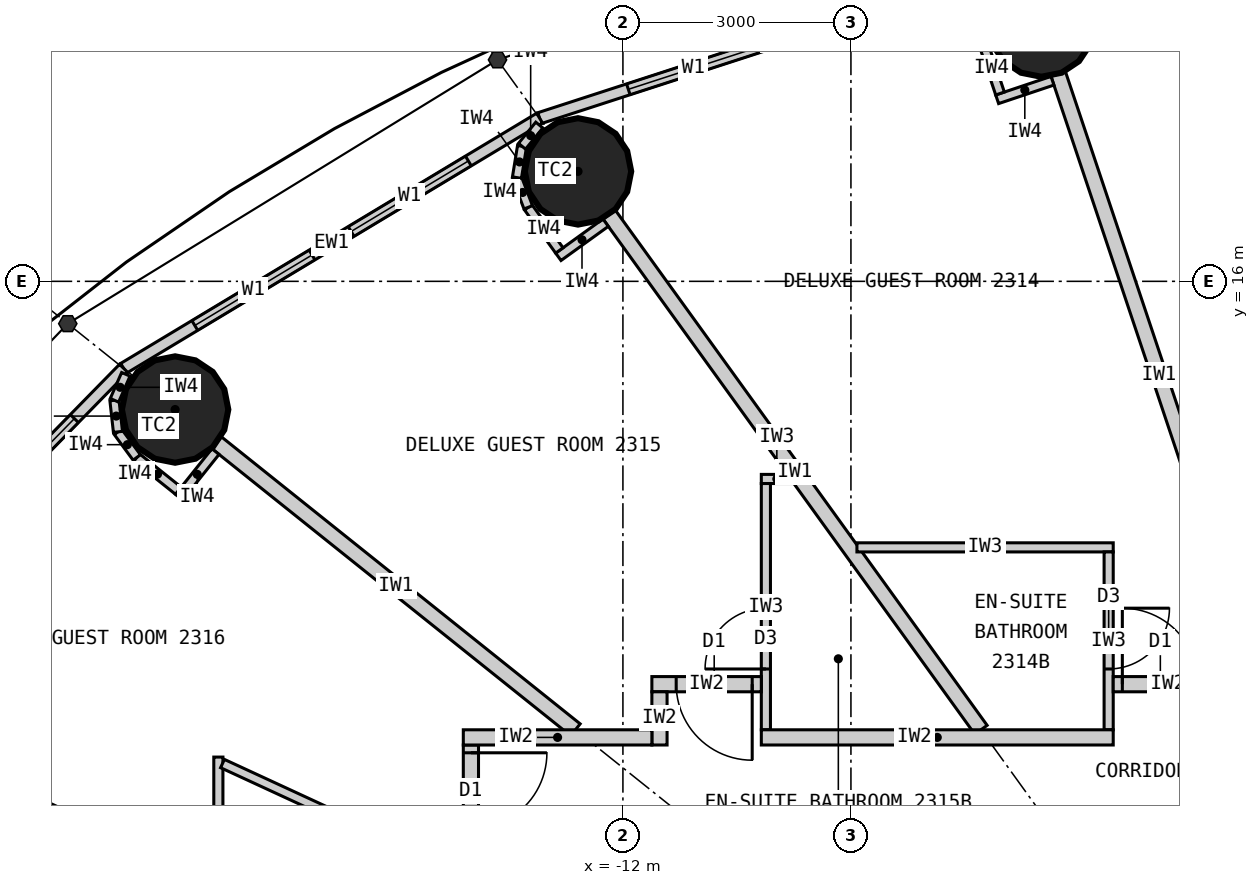
"""IFC4 building model, lengths in metres.
Left out: names, types, materials, properties, quantities, classifications, styles, units other than length and angle.
Written with IfcOpenShell. Run it as: python <this file> out.ifc"""

import sys

from ifc_helpers import new_model, si_unit, direction, frame, frame_2d, origin, origin_2d, place, context, subcontext, project, spatial, rectangle, circle, extrude, clip, halfspace, element, fill, save


model = new_model("IFC4")
c1 = context("Model", 3, precision=1e-05, world=origin(), true_north=direction((0.0, 1.0)))
c2 = subcontext(c1, "Body", "Model", "MODEL_VIEW")
j1 = project(units=[si_unit("LENGTHUNIT", "METRE"), si_unit("PLANEANGLEUNIT", "RADIAN")], contexts=[c1])
p1 = place(None, origin())
s1 = spatial("IfcSite", under=j1, at=p1, CompositionType="ELEMENT")
p2 = place(p1, origin())
s2 = spatial("IfcBuilding", under=s1, at=p2, CompositionType="ELEMENT")
p3 = place(p2, frame((0.0, 0.0, 90.3)))
s3 = spatial("IfcBuildingStorey", under=s2, at=p3, CompositionType="ELEMENT", Elevation=90.3)
for number, where, z_axis, x_axis in (
    (1, (-6.495, 19.391, 0.0), (0.0, 0.0, 1.0), (1.0, 0.0, 0.0)),
    (2, (-12.591, 17.447, 0.0), (0.0, 0.0, 1.0), (1.0, 0.0, 0.0)),
    (3, (-17.892, 14.313, 0.0), (0.0, 0.0, 1.0), (1.0, 0.0, 0.0)),
):
    element("IfcColumn", number, at=place(p3, frame(where, z_axis=z_axis, x_axis=x_axis)), inside=s3, PredefinedType="COLUMN", context=c2, shape_type="Clipping", body=[
        clip(extrude(circle(Radius=0.7, at=origin_2d()), origin(), (0.0, 0.0, 1.0), 3.3), halfspace(frame((0.0, 0.0, 2.25), z_axis=(0.0, 0.0, 1.0), x_axis=(1.0, 0.0, 0.0)), False)),
    ])
p4 = place(p3, frame((-6.766, 20.202, 0.0), z_axis=(0.0, 0.0, 1.0), x_axis=(-0.951137534625, -0.308767534285, 0.0)))
e4 = element("IfcWall", 4, at=p4, inside=s3, PredefinedType="ELEMENTEDWALL", context=c2, shape_type="SweptSolid", body=[
    extrude(rectangle(XDim=6.655, YDim=0.15, at=frame_2d((3.328, 0.0))), origin(), (0.0, 0.0, 1.0), 3.05),
])
p5 = place(p4, frame((1.228, 0.0, 0.9)))
e5 = element("IfcOpeningElement", 5, at=p5, cuts=e4, PredefinedType="OPENING", context=c2, shape_type="SweptSolid", body=[
    extrude(rectangle(XDim=1.8, YDim=1.9, at=frame_2d((0.9, 0.95))), frame((0.0, 0.085, 0.0), z_axis=(0.0, -1.0, 0.0), x_axis=(1.0, 0.0, 0.0)), (0.0, 0.0, 1.0), 0.17),
])
p6 = place(p4, frame((3.628, 0.0, 0.9)))
e6 = element("IfcOpeningElement", 6, at=p6, cuts=e4, PredefinedType="OPENING", context=c2, shape_type="SweptSolid", body=[
    extrude(rectangle(XDim=1.8, YDim=1.9, at=frame_2d((0.9, 0.95))), frame((0.0, 0.085, 0.0), z_axis=(0.0, -1.0, 0.0), x_axis=(1.0, 0.0, 0.0)), (0.0, 0.0, 1.0), 0.17),
])
p7 = place(p3, frame((-13.096, 18.147, 0.0), z_axis=(0.0, 0.0, 1.0), x_axis=(-0.856983180864, -0.515344377787, 0.0)))
e7 = element("IfcWall", 7, at=p7, inside=s3, PredefinedType="ELEMENTEDWALL", context=c2, shape_type="SweptSolid", body=[
    extrude(rectangle(XDim=6.386, YDim=0.15, at=frame_2d((3.193, 0.0))), origin(), (0.0, 0.0, 1.0), 3.05),
])
p8 = place(p7, frame((1.093, 0.0, 0.9)))
e8 = element("IfcOpeningElement", 8, at=p8, cuts=e7, PredefinedType="OPENING", context=c2, shape_type="SweptSolid", body=[
    extrude(rectangle(XDim=1.8, YDim=1.9, at=frame_2d((0.9, 0.95))), frame((0.0, 0.085, 0.0), z_axis=(0.0, -1.0, 0.0), x_axis=(1.0, 0.0, 0.0)), (0.0, 0.0, 1.0), 0.17),
])
p9 = place(p7, frame((3.493, 0.0, 0.9)))
e9 = element("IfcOpeningElement", 9, at=p9, cuts=e7, PredefinedType="OPENING", context=c2, shape_type="SweptSolid", body=[
    extrude(rectangle(XDim=1.8, YDim=1.9, at=frame_2d((0.9, 0.95))), frame((0.0, 0.085, 0.0), z_axis=(0.0, -1.0, 0.0), x_axis=(1.0, 0.0, 0.0)), (0.0, 0.0, 1.0), 0.17),
])
p10 = place(p3, frame((-18.57, 14.856, 0.0), z_axis=(0.0, 0.0, 1.0), x_axis=(-0.699602905915, -0.714531856557, 0.0)))
e10 = element("IfcWall", 10, at=p10, inside=s3, PredefinedType="ELEMENTEDWALL", context=c2, shape_type="SweptSolid", body=[
    extrude(rectangle(XDim=6.051, YDim=0.15, at=frame_2d((3.025, 0.0))), origin(), (0.0, 0.0, 1.0), 3.05),
])
p11 = place(p10, frame((0.926, 0.0, 0.9)))
e11 = element("IfcOpeningElement", 11, at=p11, cuts=e10, PredefinedType="OPENING", context=c2, shape_type="SweptSolid", body=[
    extrude(rectangle(XDim=1.8, YDim=1.9, at=frame_2d((0.9, 0.95))), frame((0.0, 0.085, 0.0), z_axis=(0.0, -1.0, 0.0), x_axis=(1.0, 0.0, 0.0)), (0.0, 0.0, 1.0), 0.17),
])
p12 = place(p10, frame((3.325, 0.0, 0.9)))
e12 = element("IfcOpeningElement", 12, at=p12, cuts=e10, PredefinedType="OPENING", context=c2, shape_type="SweptSolid", body=[
    extrude(rectangle(XDim=1.8, YDim=1.9, at=frame_2d((0.9, 0.95))), frame((0.0, 0.085, 0.0), z_axis=(0.0, -1.0, 0.0), x_axis=(1.0, 0.0, 0.0)), (0.0, 0.0, 1.0), 0.17),
])
p13 = place(p3, frame((-3.617, 10.8, 0.0), z_axis=(0.0, 0.0, 1.0), x_axis=(-0.317576599239, 0.948232621046, 0.0)))
e13 = element("IfcWall", 13, at=p13, inside=s3, PredefinedType="PARTITIONING", context=c2, shape_type="SweptSolid", body=[
    extrude(rectangle(XDim=8.36, YDim=0.2, at=frame_2d((4.18, 0.0))), origin(), (0.0, 0.0, 1.0), 2.15),
])
p14 = place(p3, frame((-7.289, 10.1, 0.0), z_axis=(0.0, 0.0, 1.0), x_axis=(-0.585198353053, 0.810890182197, 0.0)))
e14 = element("IfcWall", 14, at=p14, inside=s3, PredefinedType="PARTITIONING", context=c2, shape_type="SweptSolid", body=[
    extrude(rectangle(XDim=8.36, YDim=0.2, at=frame_2d((4.18, 0.0))), origin(), (0.0, 0.0, 1.0), 2.15),
])
p15 = place(p3, frame((-12.625, 10.1, 0.0), z_axis=(0.0, 0.0, 1.0), x_axis=(-0.780892451574, 0.624665493744, 0.0)))
e15 = element("IfcWall", 15, at=p15, inside=s3, PredefinedType="PARTITIONING", context=c2, shape_type="SweptSolid", body=[
    extrude(rectangle(XDim=6.045, YDim=0.2, at=frame_2d((3.022, 0.0))), origin(), (0.0, 0.0, 1.0), 2.25),
])
p16 = place(p3, frame((-14.1, 6.512, 0.0), z_axis=(0.0, 0.0, 1.0), x_axis=(-0.907832871056, 0.419332181247, 0.0)))
e16 = element("IfcWall", 16, at=p16, inside=s3, PredefinedType="PARTITIONING", context=c2, shape_type="SweptSolid", body=[
    extrude(rectangle(XDim=8.023, YDim=0.2, at=frame_2d((4.011, 0.0))), origin(), (0.0, 0.0, 1.0), 2.15),
])
p17 = place(p3, frame((-8.921, 12.5, 0.0), z_axis=(0.0, 0.0, 1.0), x_axis=(1.0, 0.0, 0.0)))
e17 = element("IfcWall", 17, at=p17, inside=s3, PredefinedType="PARTITIONING", context=c2, shape_type="SweptSolid", body=[
    extrude(rectangle(XDim=3.372, YDim=0.12, at=frame_2d((1.686, 0.0))), origin(), (0.0, 0.0, 1.0), 3.05),
])
p18 = place(p3, frame((-5.609, 10.1, 0.0), z_axis=(0.0, 0.0, 1.0), x_axis=(0.0, 1.0, 0.0)))
e18 = element("IfcWall", 18, at=p18, inside=s3, PredefinedType="PARTITIONING", context=c2, shape_type="SweptSolid", body=[
    extrude(rectangle(XDim=2.34, YDim=0.12, at=frame_2d((1.17, 0.0))), origin(), (0.0, 0.0, 1.0), 3.05),
])
p19 = place(p18, frame((0.8, 0.0, 0.0)))
e19 = element("IfcOpeningElement", 19, at=p19, cuts=e18, PredefinedType="OPENING", context=c2, shape_type="SweptSolid", body=[
    extrude(rectangle(XDim=0.8, YDim=2.1, at=frame_2d((0.4, 1.05))), frame((0.0, 0.07, 0.0), z_axis=(0.0, -1.0, 0.0), x_axis=(1.0, 0.0, 0.0)), (0.0, 0.0, 1.0), 0.14),
])
p20 = place(p3, frame((-9.771, 13.4, 0.0), z_axis=(0.0, 0.0, 1.0), x_axis=(-1.0, 0.0, 0.0)))
e20 = element("IfcWall", 20, at=p20, inside=s3, PredefinedType="PARTITIONING", context=c2, shape_type="SweptSolid", body=[
    extrude(rectangle(XDim=0.408, YDim=0.12, at=frame_2d((0.204, 0.0))), origin(), (0.0, 0.0, 1.0), 3.05),
])
p21 = place(p3, frame((-10.119, 10.1, 0.0), z_axis=(0.0, 0.0, 1.0), x_axis=(0.0, 1.0, 0.0)))
e21 = element("IfcWall", 21, at=p21, inside=s3, PredefinedType="PARTITIONING", context=c2, shape_type="SweptSolid", body=[
    extrude(rectangle(XDim=3.24, YDim=0.12, at=frame_2d((1.62, 0.0))), origin(), (0.0, 0.0, 1.0), 3.05),
])
p22 = place(p21, frame((0.8, 0.0, 0.0)))
e22 = element("IfcOpeningElement", 22, at=p22, cuts=e21, PredefinedType="OPENING", context=c2, shape_type="SweptSolid", body=[
    extrude(rectangle(XDim=0.8, YDim=2.1, at=frame_2d((0.4, 1.05))), frame((0.0, 0.07, 0.0), z_axis=(0.0, -1.0, 0.0), x_axis=(1.0, 0.0, 0.0)), (0.0, 0.0, 1.0), 0.14),
])
p23 = place(p3, frame((-17.323, 8.101, 0.0), z_axis=(0.0, 0.0, 1.0), x_axis=(0.0, 1.0, 0.0)))
e23 = element("IfcWall", 23, at=p23, inside=s3, PredefinedType="PARTITIONING", context=c2, shape_type="SweptSolid", body=[
    extrude(rectangle(XDim=1.64, YDim=0.12, at=frame_2d((0.82, 0.0))), origin(), (0.0, 0.0, 1.0), 3.05),
])
p24 = place(p3, frame((-14.1, 8.193, 0.0), z_axis=(0.0, 0.0, 1.0), x_axis=(-0.907836493557, 0.419324338628, 0.0)))
e24 = element("IfcWall", 24, at=p24, inside=s3, PredefinedType="PARTITIONING", context=c2, shape_type="SweptSolid", body=[
    extrude(rectangle(XDim=3.49, YDim=0.12, at=frame_2d((1.745, 0.0))), origin(), (0.0, 0.0, 1.0), 3.05),
])
p25 = place(p24, frame((0.75, 0.0, 0.0)))
e25 = element("IfcOpeningElement", 25, at=p25, cuts=e24, PredefinedType="OPENING", context=c2, shape_type="SweptSolid", body=[
    extrude(rectangle(XDim=0.8, YDim=2.1, at=frame_2d((0.4, 1.05))), frame((0.0, 0.07, 0.0), z_axis=(0.0, -1.0, 0.0), x_axis=(1.0, 0.0, 0.0)), (0.0, 0.0, 1.0), 0.14),
])
p26 = place(p3, frame((-5.549, 10.7, 0.0), z_axis=(0.0, 0.0, 1.0), x_axis=(1.0, 0.0, 0.0)))
e26 = element("IfcWall", 26, at=p26, inside=s3, PredefinedType="PARTITIONING", context=c2, shape_type="SweptSolid", body=[
    extrude(rectangle(XDim=1.44, YDim=0.2, at=frame_2d((0.72, 0.0))), origin(), (0.0, 0.0, 1.0), 3.05),
])
p27 = place(p26, frame((0.12, 0.0, 0.0)))
e27 = element("IfcOpeningElement", 27, at=p27, cuts=e26, PredefinedType="OPENING", context=c2, shape_type="SweptSolid", body=[
    extrude(rectangle(XDim=1.0, YDim=2.2, at=frame_2d((0.5, 1.1))), frame((0.0, 0.11, 0.0), z_axis=(0.0, -1.0, 0.0), x_axis=(1.0, 0.0, 0.0)), (0.0, 0.0, 1.0), 0.22),
])
p28 = place(p3, frame((-11.619, 10.7, 0.0), z_axis=(0.0, 0.0, 1.0), x_axis=(1.0, 0.0, 0.0)))
e28 = element("IfcWall", 28, at=p28, inside=s3, PredefinedType="PARTITIONING", context=c2, shape_type="SweptSolid", body=[
    extrude(rectangle(XDim=1.44, YDim=0.2, at=frame_2d((0.72, 0.0))), origin(), (0.0, 0.0, 1.0), 3.05),
])
p29 = place(p28, frame((0.32, 0.0, 0.0)))
e29 = element("IfcOpeningElement", 29, at=p29, cuts=e28, PredefinedType="OPENING", context=c2, shape_type="SweptSolid", body=[
    extrude(rectangle(XDim=1.0, YDim=2.2, at=frame_2d((0.5, 1.1))), frame((0.0, 0.11, 0.0), z_axis=(0.0, -1.0, 0.0), x_axis=(1.0, 0.0, 0.0)), (0.0, 0.0, 1.0), 0.22),
])
p30 = place(p3, frame((-11.519, 9.9, 0.0), z_axis=(0.0, 0.0, 1.0), x_axis=(0.0, 1.0, 0.0)))
e30 = element("IfcWall", 30, at=p30, inside=s3, PredefinedType="PARTITIONING", context=c2, shape_type="SweptSolid", body=[
    extrude(rectangle(XDim=0.7, YDim=0.2, at=frame_2d((0.35, 0.0))), origin(), (0.0, 0.0, 1.0), 3.05),
])
p31 = place(p3, frame((-14.0, 9.9, 0.0), z_axis=(0.0, 0.0, 1.0), x_axis=(0.0, -1.0, 0.0)))
e31 = element("IfcWall", 31, at=p31, inside=s3, PredefinedType="PARTITIONING", context=c2, shape_type="SweptSolid", body=[
    extrude(rectangle(XDim=5.127, YDim=0.2, at=frame_2d((2.564, 0.0))), origin(), (0.0, 0.0, 1.0), 3.05),
])
p32 = place(p31, frame((0.103, 0.0, 0.0)))
e32 = element("IfcOpeningElement", 32, at=p32, cuts=e31, PredefinedType="OPENING", context=c2, shape_type="SweptSolid", body=[
    extrude(rectangle(XDim=1.0, YDim=2.2, at=frame_2d((0.5, 1.1))), frame((0.0, 0.11, 0.0), z_axis=(0.0, -1.0, 0.0), x_axis=(1.0, 0.0, 0.0)), (0.0, 0.0, 1.0), 0.22),
])
p33 = place(p3, frame((-14.1, 10.0, 0.0), z_axis=(0.0, 0.0, 1.0), x_axis=(1.0, 0.0, 0.0)))
e33 = element("IfcWall", 33, at=p33, inside=s3, PredefinedType="PARTITIONING", context=c2, shape_type="SweptSolid", body=[
    extrude(rectangle(XDim=2.481, YDim=0.2, at=frame_2d((1.24, 0.0))), origin(), (0.0, 0.0, 1.0), 3.05),
])
p34 = place(p3, frame((-10.179, 10.0, 0.0), z_axis=(0.0, 0.0, 1.0), x_axis=(1.0, 0.0, 0.0)))
e34 = element("IfcWall", 34, at=p34, inside=s3, PredefinedType="PARTITIONING", context=c2, shape_type="SweptSolid", body=[
    extrude(rectangle(XDim=4.63, YDim=0.2, at=frame_2d((2.315, 0.0))), origin(), (0.0, 0.0, 1.0), 3.05),
])
p35 = place(p3, frame((-6.348, 18.639, 0.0), z_axis=(0.0, 0.0, 1.0), x_axis=(-0.948268951266, -0.317468102437, 0.0)))
e35 = element("IfcWall", 35, at=p35, inside=s3, PredefinedType="PARTITIONING", context=c2, shape_type="SweptSolid", body=[
    extrude(rectangle(XDim=0.768, YDim=0.12, at=frame_2d((0.384, 0.0))), origin(), (0.0, 0.0, 1.0), 3.05),
])
p36 = place(p3, frame((-7.038, 18.471, 0.0), z_axis=(0.0, 0.0, 1.0), x_axis=(-0.317378466199, 0.9482989556, 0.0)))
e36 = element("IfcWall", 36, at=p36, inside=s3, PredefinedType="PARTITIONING", context=c2, shape_type="SweptSolid", body=[
    extrude(rectangle(XDim=0.7, YDim=0.12, at=frame_2d((0.35, 0.0))), origin(), (0.0, 0.0, 1.0), 3.05),
])
p37 = place(p3, frame((-12.227, 16.772, 0.0), z_axis=(0.0, 0.0, 1.0), x_axis=(-0.810821798253, -0.585293098778, 0.0)))
e37 = element("IfcWall", 37, at=p37, inside=s3, PredefinedType="PARTITIONING", context=c2, shape_type="SweptSolid", body=[
    extrude(rectangle(XDim=0.768, YDim=0.12, at=frame_2d((0.384, 0.0))), origin(), (0.0, 0.0, 1.0), 3.05),
])
p38 = place(p3, frame((-12.836, 16.406, 0.0), z_axis=(0.0, 0.0, 1.0), x_axis=(-0.585223113993, 0.810872312296, 0.0)))
e38 = element("IfcWall", 38, at=p38, inside=s3, PredefinedType="PARTITIONING", context=c2, shape_type="SweptSolid", body=[
    extrude(rectangle(XDim=0.7, YDim=0.12, at=frame_2d((0.35, 0.0))), origin(), (0.0, 0.0, 1.0), 3.05),
])
p39 = place(p3, frame((-13.246, 16.974, 0.0), z_axis=(0.0, 0.0, 1.0), x_axis=(-0.355728122235, 0.934589483705, 0.0)))
e39 = element("IfcWall", 39, at=p39, inside=s3, PredefinedType="PARTITIONING", context=c2, shape_type="SweptSolid", body=[
    extrude(rectangle(XDim=0.418, YDim=0.12, at=frame_2d((0.209, 0.0))), origin(), (0.0, 0.0, 1.0), 3.05),
])
p40 = place(p3, frame((-13.394, 17.365, 0.0), z_axis=(0.0, 0.0, 1.0), x_axis=(0.159379276926, 0.987217425943, 0.0)))
e40 = element("IfcWall", 40, at=p40, inside=s3, PredefinedType="PARTITIONING", context=c2, shape_type="SweptSolid", body=[
    extrude(rectangle(XDim=0.418, YDim=0.12, at=frame_2d((0.209, 0.0))), origin(), (0.0, 0.0, 1.0), 3.05),
])
p41 = place(p3, frame((-13.328, 17.777, 0.0), z_axis=(0.0, 0.0, 1.0), x_axis=(0.632276783541, 0.774742582407, 0.0)))
e41 = element("IfcWall", 41, at=p41, inside=s3, PredefinedType="PARTITIONING", context=c2, shape_type="SweptSolid", body=[
    extrude(rectangle(XDim=0.36, YDim=0.12, at=frame_2d((0.18, 0.0))), origin(), (0.0, 0.0, 1.0), 3.05),
])
p42 = place(p3, frame((-17.361, 13.76, 0.0), z_axis=(0.0, 0.0, 1.0), x_axis=(-0.624501042889, -0.781023973659, 0.0)))
e42 = element("IfcWall", 42, at=p42, inside=s3, PredefinedType="PARTITIONING", context=c2, shape_type="SweptSolid", body=[
    extrude(rectangle(XDim=0.767, YDim=0.12, at=frame_2d((0.384, 0.0))), origin(), (0.0, 0.0, 1.0), 3.05),
])
p43 = place(p3, frame((-17.85, 13.246, 0.0), z_axis=(0.0, 0.0, 1.0), x_axis=(-0.780902834923, 0.62465251333, 0.0)))
e43 = element("IfcWall", 43, at=p43, inside=s3, PredefinedType="PARTITIONING", context=c2, shape_type="SweptSolid", body=[
    extrude(rectangle(XDim=0.7, YDim=0.12, at=frame_2d((0.35, 0.0))), origin(), (0.0, 0.0, 1.0), 3.05),
])
for number, where, z_axis, x_axis in (
    (44, (-18.396, 13.683, 0.0), (0.0, 0.0, 1.0), (-0.592, 0.806, 0.0)),
    (45, (-18.644, 14.02, 0.0), (0.0, 0.0, 1.0), (-0.11, 0.994, 0.0)),
):
    element("IfcWall", number, at=place(p3, frame(where, z_axis=z_axis, x_axis=x_axis)), inside=s3, PredefinedType="PARTITIONING", context=c2, shape_type="SweptSolid", body=[
        extrude(rectangle(XDim=0.418, YDim=0.12, at=frame_2d((0.209, 0.0))), origin(), (0.0, 0.0, 1.0), 3.05),
    ])
p44 = place(p3, frame((-18.69, 14.435, 0.0), z_axis=(0.0, 0.0, 1.0), x_axis=(0.401093412634, 0.91603715773, 0.0)))
e46 = element("IfcWall", 46, at=p44, inside=s3, PredefinedType="PARTITIONING", context=c2, shape_type="SweptSolid", body=[
    extrude(rectangle(XDim=0.373, YDim=0.12, at=frame_2d((0.187, 0.0))), origin(), (0.0, 0.0, 1.0), 3.05),
])
p45 = place(p6, origin())
e47 = element("IfcWindow", 47, at=p45, inside=s3, PartitioningType="SINGLE_PANEL", PredefinedType="WINDOW", context=c2, shape_type="SweptSolid", body=[
    extrude(rectangle(XDim=1.8, YDim=1.9, at=frame_2d((0.9, 0.95))), frame((0.0, 0.03, 0.0), z_axis=(0.0, -1.0, 0.0), x_axis=(1.0, 0.0, 0.0)), (0.0, 0.0, 1.0), 0.06),
])
fill(e6, e47)
p46 = place(p8, origin())
e48 = element("IfcWindow", 48, at=p46, inside=s3, PartitioningType="SINGLE_PANEL", PredefinedType="WINDOW", context=c2, shape_type="SweptSolid", body=[
    extrude(rectangle(XDim=1.8, YDim=1.9, at=frame_2d((0.9, 0.95))), frame((0.0, 0.03, 0.0), z_axis=(0.0, -1.0, 0.0), x_axis=(1.0, 0.0, 0.0)), (0.0, 0.0, 1.0), 0.06),
])
fill(e8, e48)
p47 = place(p9, origin())
e49 = element("IfcWindow", 49, at=p47, inside=s3, PartitioningType="SINGLE_PANEL", PredefinedType="WINDOW", context=c2, shape_type="SweptSolid", body=[
    extrude(rectangle(XDim=1.8, YDim=1.9, at=frame_2d((0.9, 0.95))), frame((0.0, 0.03, 0.0), z_axis=(0.0, -1.0, 0.0), x_axis=(1.0, 0.0, 0.0)), (0.0, 0.0, 1.0), 0.06),
])
fill(e9, e49)
p48 = place(p11, origin())
e50 = element("IfcWindow", 50, at=p48, inside=s3, PartitioningType="SINGLE_PANEL", PredefinedType="WINDOW", context=c2, shape_type="SweptSolid", body=[
    extrude(rectangle(XDim=1.8, YDim=1.9, at=frame_2d((0.9, 0.95))), frame((0.0, 0.03, 0.0), z_axis=(0.0, -1.0, 0.0), x_axis=(1.0, 0.0, 0.0)), (0.0, 0.0, 1.0), 0.06),
])
fill(e11, e50)
p49 = place(p19, origin())
e51 = element("IfcDoor", 51, at=p49, inside=s3, OperationType="SINGLE_SWING_RIGHT", PredefinedType="DOOR", context=c2, shape_type="SweptSolid", body=[
    extrude(rectangle(XDim=0.8, YDim=2.1, at=frame_2d((0.4, 1.05))), frame((0.0, 0.025, 0.0), z_axis=(0.0, -1.0, 0.0), x_axis=(1.0, 0.0, 0.0)), (0.0, 0.0, 1.0), 0.05),
])
fill(e19, e51)
p50 = place(p27, origin())
e52 = element("IfcDoor", 52, at=p50, inside=s3, OperationType="SINGLE_SWING_LEFT", PredefinedType="DOOR", context=c2, shape_type="SweptSolid", body=[
    extrude(rectangle(XDim=1.0, YDim=2.2, at=frame_2d((0.5, 1.1))), frame((0.0, 0.025, 0.0), z_axis=(0.0, -1.0, 0.0), x_axis=(1.0, 0.0, 0.0)), (0.0, 0.0, 1.0), 0.05),
])
fill(e27, e52)
p51 = place(p22, origin())
e53 = element("IfcDoor", 53, at=p51, inside=s3, OperationType="SINGLE_SWING_LEFT", PredefinedType="DOOR", context=c2, shape_type="SweptSolid", body=[
    extrude(rectangle(XDim=0.8, YDim=2.1, at=frame_2d((0.4, 1.05))), frame((0.0, 0.025, 0.0), z_axis=(0.0, -1.0, 0.0), x_axis=(1.0, 0.0, 0.0)), (0.0, 0.0, 1.0), 0.05),
])
fill(e22, e53)
p52 = place(p29, origin())
e54 = element("IfcDoor", 54, at=p52, inside=s3, OperationType="SINGLE_SWING_RIGHT", PredefinedType="DOOR", context=c2, shape_type="SweptSolid", body=[
    extrude(rectangle(XDim=1.0, YDim=2.2, at=frame_2d((0.5, 1.1))), frame((0.0, 0.025, 0.0), z_axis=(0.0, -1.0, 0.0), x_axis=(1.0, 0.0, 0.0)), (0.0, 0.0, 1.0), 0.05),
])
fill(e29, e54)
p53 = place(p32, origin())
e55 = element("IfcDoor", 55, at=p53, inside=s3, OperationType="SINGLE_SWING_LEFT", PredefinedType="DOOR", context=c2, shape_type="SweptSolid", body=[
    extrude(rectangle(XDim=1.0, YDim=2.2, at=frame_2d((0.5, 1.1))), frame((0.0, 0.025, 0.0), z_axis=(0.0, -1.0, 0.0), x_axis=(1.0, 0.0, 0.0)), (0.0, 0.0, 1.0), 0.05),
])
fill(e32, e55)
save(model, sys.argv[1])
